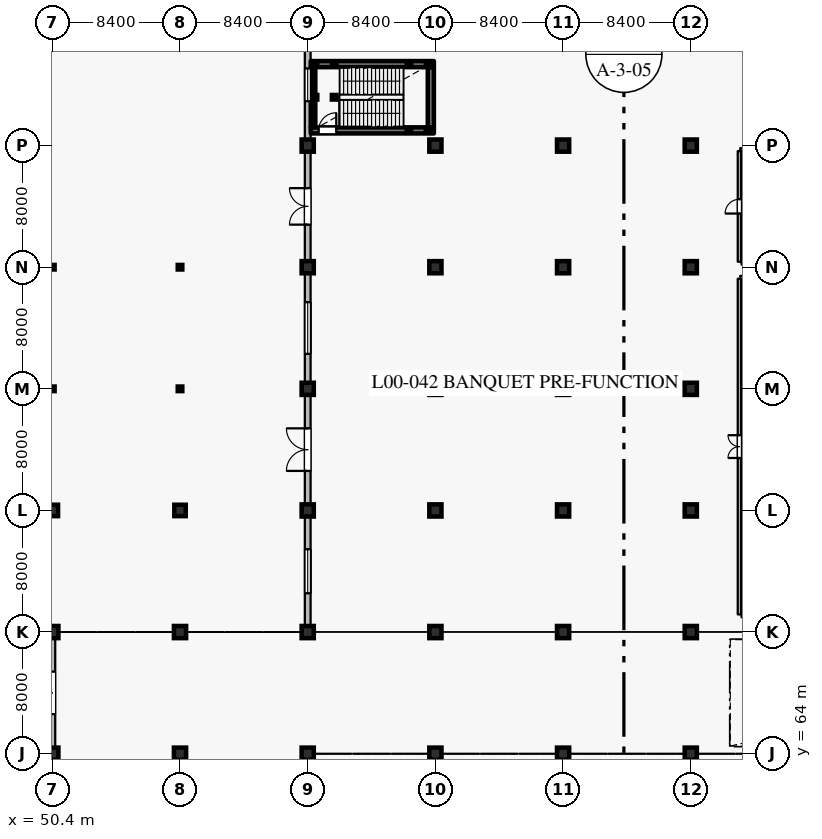
"""IFC4 building model, lengths in metres.
Left out: names, types, materials, properties, quantities, classifications, styles, units other than length and angle.
Written with IfcOpenShell. Run it as: python <this file> out.ifc"""

import sys

from ifc_helpers import new_model, si_unit, direction, frame, frame_2d, origin, origin_2d, place, context, subcontext, project, spatial, rectangle, hollow_rectangle, circle, extrude, element, fill, save


model = new_model("IFC4")
c1 = context("Model", 3, precision=1e-05, world=origin(), true_north=direction((0.0, 1.0)))
c2 = subcontext(c1, "Body", "Model", "MODEL_VIEW")
j1 = project(units=[si_unit("LENGTHUNIT", "METRE"), si_unit("PLANEANGLEUNIT", "RADIAN")], contexts=[c1])
p1 = place(None, origin())
s1 = spatial("IfcSite", under=j1, at=p1, CompositionType="ELEMENT")
p2 = place(p1, origin())
s2 = spatial("IfcBuilding", under=s1, at=p2, CompositionType="ELEMENT")
p3 = place(p2, origin())
s3 = spatial("IfcBuildingStorey", under=s2, at=p3, CompositionType="ELEMENT", Elevation=0.0)
for number, where, z_axis, x_axis in (
    (1, (50.4, 64.0, 0.0), (0.0, 0.0, 1.0), (1.0, 0.0, 0.0)),
    (2, (50.4, 72.0, 0.0), (0.0, 0.0, 1.0), (1.0, 0.0, 0.0)),
):
    element("IfcColumn", number, at=place(p3, frame(where, z_axis=z_axis, x_axis=x_axis)), inside=s3, PredefinedType="COLUMN", context=c2, shape_type="SweptSolid", body=[
        extrude(rectangle(XDim=0.8, YDim=0.8, at=origin_2d()), origin(), (0.0, 0.0, 1.0), 6.0),
    ])
p4 = place(p3, frame((50.4, 80.0, 0.0), z_axis=(0.0, 0.0, 1.0), x_axis=(1.0, 0.0, 0.0)))
e3 = element("IfcColumn", 3, at=p4, inside=s3, PredefinedType="COLUMN", context=c2, shape_type="SweptSolid", body=[
    extrude(circle(Radius=0.375, at=origin_2d()), origin(), (0.0, 0.0, 1.0), 6.0),
])
for number, where, z_axis, x_axis in (
    (4, (50.4, 88.0, 0.0), (0.0, 0.0, 1.0), (1.0, 0.0, 0.0)),
    (5, (50.4, 96.0, 0.0), (0.0, 0.0, 1.0), (1.0, 0.0, 0.0)),
):
    element("IfcColumn", number, at=place(p3, frame(where, z_axis=z_axis, x_axis=x_axis)), inside=s3, PredefinedType="COLUMN", context=c2, shape_type="SweptSolid", body=[
        extrude(hollow_rectangle(XDim=0.3, YDim=0.3, WallThickness=0.012, at=origin_2d()), origin(), (0.0, 0.0, 1.0), 6.0),
    ])
for number, where, z_axis, x_axis in (
    (6, (58.8, 64.0, 0.0), (0.0, 0.0, 1.0), (1.0, 0.0, 0.0)),
    (7, (58.8, 72.0, 0.0), (0.0, 0.0, 1.0), (1.0, 0.0, 0.0)),
):
    element("IfcColumn", number, at=place(p3, frame(where, z_axis=z_axis, x_axis=x_axis)), inside=s3, PredefinedType="COLUMN", context=c2, shape_type="SweptSolid", body=[
        extrude(rectangle(XDim=0.8, YDim=0.8, at=origin_2d()), origin(), (0.0, 0.0, 1.0), 6.0),
    ])
p5 = place(p3, frame((58.8, 80.0, 0.0), z_axis=(0.0, 0.0, 1.0), x_axis=(1.0, 0.0, 0.0)))
e8 = element("IfcColumn", 8, at=p5, inside=s3, PredefinedType="COLUMN", context=c2, shape_type="SweptSolid", body=[
    extrude(circle(Radius=0.375, at=origin_2d()), origin(), (0.0, 0.0, 1.0), 6.0),
])
for number, where, z_axis, x_axis in (
    (9, (58.8, 88.0, 0.0), (0.0, 0.0, 1.0), (1.0, 0.0, 0.0)),
    (10, (58.8, 96.0, 0.0), (0.0, 0.0, 1.0), (1.0, 0.0, 0.0)),
):
    element("IfcColumn", number, at=place(p3, frame(where, z_axis=z_axis, x_axis=x_axis)), inside=s3, PredefinedType="COLUMN", context=c2, shape_type="SweptSolid", body=[
        extrude(hollow_rectangle(XDim=0.3, YDim=0.3, WallThickness=0.012, at=origin_2d()), origin(), (0.0, 0.0, 1.0), 6.0),
    ])
for number, where, z_axis, x_axis in (
    (11, (67.2, 64.0, 0.0), (0.0, 0.0, 1.0), (1.0, 0.0, 0.0)),
    (12, (67.2, 72.0, 0.0), (0.0, 0.0, 1.0), (1.0, 0.0, 0.0)),
    (13, (67.2, 80.0, 0.0), (0.0, 0.0, 1.0), (1.0, 0.0, 0.0)),
    (14, (67.2, 88.0, 0.0), (0.0, 0.0, 1.0), (1.0, 0.0, 0.0)),
    (15, (67.2, 96.0, 0.0), (0.0, 0.0, 1.0), (1.0, 0.0, 0.0)),
    (16, (67.2, 104.0, 0.0), (0.0, 0.0, 1.0), (1.0, 0.0, 0.0)),
    (17, (75.6, 64.0, 0.0), (0.0, 0.0, 1.0), (1.0, 0.0, 0.0)),
    (18, (75.6, 72.0, 0.0), (0.0, 0.0, 1.0), (1.0, 0.0, 0.0)),
    (19, (75.6, 80.0, 0.0), (0.0, 0.0, 1.0), (1.0, 0.0, 0.0)),
    (20, (75.6, 88.0, 0.0), (0.0, 0.0, 1.0), (1.0, 0.0, 0.0)),
    (21, (75.6, 96.0, 0.0), (0.0, 0.0, 1.0), (1.0, 0.0, 0.0)),
    (22, (75.6, 104.0, 0.0), (0.0, 0.0, 1.0), (1.0, 0.0, 0.0)),
    (23, (84.0, 64.0, 0.0), (0.0, 0.0, 1.0), (1.0, 0.0, 0.0)),
    (24, (84.0, 72.0, 0.0), (0.0, 0.0, 1.0), (1.0, 0.0, 0.0)),
    (25, (84.0, 80.0, 0.0), (0.0, 0.0, 1.0), (1.0, 0.0, 0.0)),
    (26, (84.0, 88.0, 0.0), (0.0, 0.0, 1.0), (1.0, 0.0, 0.0)),
    (27, (84.0, 96.0, 0.0), (0.0, 0.0, 1.0), (1.0, 0.0, 0.0)),
    (28, (84.0, 104.0, 0.0), (0.0, 0.0, 1.0), (1.0, 0.0, 0.0)),
    (29, (92.4, 64.0, 0.0), (0.0, 0.0, 1.0), (1.0, 0.0, 0.0)),
    (30, (92.4, 72.0, 0.0), (0.0, 0.0, 1.0), (1.0, 0.0, 0.0)),
    (31, (92.4, 80.0, 0.0), (0.0, 0.0, 1.0), (1.0, 0.0, 0.0)),
    (32, (92.4, 88.0, 0.0), (0.0, 0.0, 1.0), (1.0, 0.0, 0.0)),
    (33, (92.4, 96.0, 0.0), (0.0, 0.0, 1.0), (1.0, 0.0, 0.0)),
    (34, (92.4, 104.0, 0.0), (0.0, 0.0, 1.0), (1.0, 0.0, 0.0)),
):
    element("IfcColumn", number, at=place(p3, frame(where, z_axis=z_axis, x_axis=x_axis)), inside=s3, PredefinedType="COLUMN", context=c2, shape_type="SweptSolid", body=[
        extrude(rectangle(XDim=0.8, YDim=0.8, at=origin_2d()), origin(), (0.0, 0.0, 1.0), 6.0),
    ])
p6 = place(p3, frame((67.2, 72.4, 0.0), z_axis=(0.0, 0.0, 1.0), x_axis=(0.0, 1.0, 0.0)))
e35 = element("IfcWall", 35, at=p6, inside=s3, PredefinedType="SOLIDWALL", context=c2, shape_type="SweptSolid", body=[
    extrude(rectangle(XDim=7.2, YDim=0.38, at=frame_2d((3.6, 0.0))), origin(), (0.0, 0.0, 1.0), 5.7),
])
p7 = place(p6, frame((2.15, 0.0, 1.05)))
e36 = element("IfcOpeningElement", 36, at=p7, cuts=e35, PredefinedType="OPENING", context=c2, shape_type="SweptSolid", body=[
    extrude(rectangle(XDim=2.9, YDim=1.75, at=frame_2d((1.45, 0.875))), frame((0.0, 0.2, 0.0), z_axis=(0.0, -1.0, 0.0), x_axis=(1.0, 0.0, 0.0)), (0.0, 0.0, 1.0), 0.4),
])
p8 = place(p3, frame((67.2, 80.4, 0.0), z_axis=(0.0, 0.0, 1.0), x_axis=(0.0, 1.0, 0.0)))
e37 = element("IfcWall", 37, at=p8, inside=s3, PredefinedType="SOLIDWALL", context=c2, shape_type="SweptSolid", body=[
    extrude(rectangle(XDim=7.2, YDim=0.38, at=frame_2d((3.6, 0.0))), origin(), (0.0, 0.0, 1.0), 5.7),
])
p9 = place(p8, frame((2.2, 0.0, 0.0)))
e38 = element("IfcOpeningElement", 38, at=p9, cuts=e37, PredefinedType="OPENING", context=c2, shape_type="SweptSolid", body=[
    extrude(rectangle(XDim=2.8, YDim=2.8, at=frame_2d((1.4, 1.4))), frame((0.0, 0.2, 0.0), z_axis=(0.0, -1.0, 0.0), x_axis=(1.0, 0.0, 0.0)), (0.0, 0.0, 1.0), 0.4),
])
p10 = place(p3, frame((67.2, 88.4, 0.0), z_axis=(0.0, 0.0, 1.0), x_axis=(0.0, 1.0, 0.0)))
e39 = element("IfcWall", 39, at=p10, inside=s3, PredefinedType="SOLIDWALL", context=c2, shape_type="SweptSolid", body=[
    extrude(rectangle(XDim=7.2, YDim=0.38, at=frame_2d((3.6, 0.0))), origin(), (0.0, 0.0, 1.0), 5.7),
])
p11 = place(p10, frame((1.9, 0.0, 1.05)))
e40 = element("IfcOpeningElement", 40, at=p11, cuts=e39, PredefinedType="OPENING", context=c2, shape_type="SweptSolid", body=[
    extrude(rectangle(XDim=3.4, YDim=1.85, at=frame_2d((1.7, 0.925))), frame((0.0, 0.2, 0.0), z_axis=(0.0, -1.0, 0.0), x_axis=(1.0, 0.0, 0.0)), (0.0, 0.0, 1.0), 0.4),
])
p12 = place(p3, frame((67.2, 96.4, 0.0), z_axis=(0.0, 0.0, 1.0), x_axis=(0.0, 1.0, 0.0)))
e41 = element("IfcWall", 41, at=p12, inside=s3, PredefinedType="SOLIDWALL", context=c2, shape_type="SweptSolid", body=[
    extrude(rectangle(XDim=7.2, YDim=0.38, at=frame_2d((3.6, 0.0))), origin(), (0.0, 0.0, 1.0), 5.7),
])
p13 = place(p12, frame((2.4, 0.0, 0.0)))
e42 = element("IfcOpeningElement", 42, at=p13, cuts=e41, PredefinedType="OPENING", context=c2, shape_type="SweptSolid", body=[
    extrude(rectangle(XDim=2.4, YDim=2.6, at=frame_2d((1.2, 1.3))), frame((0.0, 0.2, 0.0), z_axis=(0.0, -1.0, 0.0), x_axis=(1.0, 0.0, 0.0)), (0.0, 0.0, 1.0), 0.4),
])
p14 = place(p3, frame((67.2, 104.4, 0.0), z_axis=(0.0, 0.0, 1.0), x_axis=(0.0, 1.0, 0.0)))
e43 = element("IfcWall", 43, at=p14, inside=s3, PredefinedType="SOLIDWALL", context=c2, shape_type="SweptSolid", body=[
    extrude(rectangle(XDim=7.2, YDim=0.38, at=frame_2d((3.6, 0.0))), origin(), (0.0, 0.0, 1.0), 5.7),
])
p15 = place(p14, frame((2.525, 0.0, 1.05)))
e44 = element("IfcOpeningElement", 44, at=p15, cuts=e43, PredefinedType="OPENING", context=c2, shape_type="SweptSolid", body=[
    extrude(rectangle(XDim=2.15, YDim=2.1, at=frame_2d((1.075, 1.05))), frame((0.0, 0.2, 0.0), z_axis=(0.0, -1.0, 0.0), x_axis=(1.0, 0.0, 0.0)), (0.0, 0.0, 1.0), 0.4),
])
p16 = place(p3, frame((50.4, 63.6, 0.0), z_axis=(0.0, 0.0, 1.0), x_axis=(0.0, -1.0, 0.0)))
e45 = element("IfcWall", 45, at=p16, inside=s3, PredefinedType="SOLIDWALL", context=c2, shape_type="SweptSolid", body=[
    extrude(rectangle(XDim=7.15, YDim=0.38, at=frame_2d((3.575, 0.0))), origin(), (0.0, 0.0, 1.0), 5.0),
])
p17 = place(p16, frame((2.375, 0.0, 0.0)))
e46 = element("IfcOpeningElement", 46, at=p17, cuts=e45, PredefinedType="OPENING", context=c2, shape_type="SweptSolid", body=[
    extrude(rectangle(XDim=2.4, YDim=2.6, at=frame_2d((1.2, 1.3))), frame((0.0, 0.2, 0.0), z_axis=(0.0, -1.0, 0.0), x_axis=(1.0, 0.0, 0.0)), (0.0, 0.0, 1.0), 0.4),
])
p18 = place(p3, frame((50.4, 64.4, 0.0), z_axis=(0.0, 0.0, 1.0), x_axis=(0.0, 1.0, 0.0)))
e47 = element("IfcWall", 47, at=p18, inside=s3, PredefinedType="SOLIDWALL", context=c2, shape_type="SweptSolid", body=[
    extrude(rectangle(XDim=7.2, YDim=0.38, at=frame_2d((3.6, 0.0))), origin(), (0.0, 0.0, 1.0), 5.7),
])
p19 = place(p18, frame((2.2, 0.0, 0.0)))
e48 = element("IfcOpeningElement", 48, at=p19, cuts=e47, PredefinedType="OPENING", context=c2, shape_type="SweptSolid", body=[
    extrude(rectangle(XDim=2.8, YDim=2.8, at=frame_2d((1.4, 1.4))), frame((0.0, 0.2, 0.0), z_axis=(0.0, -1.0, 0.0), x_axis=(1.0, 0.0, 0.0)), (0.0, 0.0, 1.0), 0.4),
])
p20 = place(p3, frame((67.4, 105.0, 0.0), z_axis=(0.0, 0.0, 1.0), x_axis=(1.0, 0.0, 0.0)))
e49 = element("IfcWall", 49, at=p20, inside=s3, PredefinedType="SHEAR", context=c2, shape_type="SweptSolid", body=[
    extrude(rectangle(XDim=8.1, YDim=0.4, at=frame_2d((4.05, 0.0))), origin(), (0.0, 0.0, 1.0), 5.675),
])
p21 = place(p20, frame((0.52, 0.0, 0.0)))
e50 = element("IfcOpeningElement", 50, at=p21, cuts=e49, PredefinedType="OPENING", context=c2, shape_type="SweptSolid", body=[
    extrude(rectangle(XDim=1.16, YDim=2.2, at=frame_2d((0.58, 1.1))), frame((0.0, 0.21, 0.0), z_axis=(0.0, -1.0, 0.0), x_axis=(1.0, 0.0, 0.0)), (0.0, 0.0, 1.0), 0.42),
])
p22 = place(p3, frame((75.3, 105.205, 0.0), z_axis=(0.0, 0.0, 1.0), x_axis=(0.0, 1.0, 0.0)))
e51 = element("IfcWall", 51, at=p22, inside=s3, PredefinedType="SHEAR", context=c2, shape_type="SweptSolid", body=[
    extrude(rectangle(XDim=3.95, YDim=0.4, at=frame_2d((1.975, 0.0))), origin(), (0.0, 0.0, 1.0), 5.675),
])
p23 = place(p3, frame((67.4, 109.36, 0.0), z_axis=(0.0, 0.0, 1.0), x_axis=(1.0, 0.0, 0.0)))
e52 = element("IfcWall", 52, at=p23, inside=s3, PredefinedType="SHEAR", context=c2, shape_type="SweptSolid", body=[
    extrude(rectangle(XDim=8.1, YDim=0.4, at=frame_2d((4.05, 0.0))), origin(), (0.0, 0.0, 1.0), 5.675),
])
p24 = place(p3, frame((67.55, 105.205, 0.0), z_axis=(0.0, 0.0, 1.0), x_axis=(0.0, 1.0, 0.0)))
e53 = element("IfcWall", 53, at=p24, inside=s3, PredefinedType="SHEAR", context=c2, shape_type="SweptSolid", body=[
    extrude(rectangle(XDim=3.95, YDim=0.3, at=frame_2d((1.975, 0.0))), origin(), (0.0, 0.0, 1.0), 5.675),
])
for number, where, z_axis, x_axis in (
    (54, (67.68, 107.18, 0.0), (0.0, 0.0, 1.0), (1.0, 0.0, 0.0)),
    (55, (67.68, 109.36, 0.0), (0.0, 0.0, 1.0), (1.0, 0.0, 0.0)),
    (56, (68.94, 107.18, 0.0), (0.0, 0.0, 1.0), (1.0, 0.0, 0.0)),
    (57, (68.94, 109.36, 0.0), (0.0, 0.0, 1.0), (1.0, 0.0, 0.0)),
):
    element("IfcColumn", number, at=place(p3, frame(where, z_axis=z_axis, x_axis=x_axis)), inside=s3, PredefinedType="COLUMN", context=c2, shape_type="SweptSolid", body=[
        extrude(hollow_rectangle(XDim=0.3, YDim=0.3, WallThickness=0.012, at=origin_2d()), origin(), (0.0, 0.0, 1.0), 5.82),
    ])
for number, where, z_axis, x_axis in (
    (58, (73.86, 105.0, -2.7), (0.0, 0.0, 1.0), (1.0, 0.0, 0.0)),
    (59, (73.86, 109.36, -2.7), (0.0, 0.0, 1.0), (1.0, 0.0, 0.0)),
    (60, (75.12, 105.0, -2.7), (0.0, 0.0, 1.0), (1.0, 0.0, 0.0)),
    (61, (75.12, 109.36, -2.7), (0.0, 0.0, 1.0), (1.0, 0.0, 0.0)),
):
    element("IfcColumn", number, at=place(p3, frame(where, z_axis=z_axis, x_axis=x_axis)), inside=s3, PredefinedType="COLUMN", context=c2, shape_type="SweptSolid", body=[
        extrude(hollow_rectangle(XDim=0.3, YDim=0.3, WallThickness=0.012, at=origin_2d()), origin(), (0.0, 0.0, 1.0), 5.52),
    ])
p25 = place(p3, frame((95.6, 73.16, 0.0), z_axis=(0.0, 0.0, 1.0), x_axis=(0.0, 1.0, 0.0)))
e62 = element("IfcWall", 62, at=p25, inside=s3, PredefinedType="PARTITIONING", context=c2, shape_type="SweptSolid", body=[
    extrude(rectangle(XDim=22.08, YDim=0.22, at=frame_2d((11.04, 0.0))), origin(), (0.0, 0.0, 1.0), 5.675),
])
p26 = place(p25, frame((10.29, 0.0, 0.0)))
e63 = element("IfcOpeningElement", 63, at=p26, cuts=e62, PredefinedType="OPENING", context=c2, shape_type="SweptSolid", body=[
    extrude(rectangle(XDim=1.5, YDim=2.3, at=frame_2d((0.75, 1.15))), frame((0.0, 0.12, 0.0), z_axis=(0.0, -1.0, 0.0), x_axis=(1.0, 0.0, 0.0)), (0.0, 0.0, 1.0), 0.24),
])
p27 = place(p3, frame((95.74, 73.08, 0.0), z_axis=(0.0, 0.0, 1.0), x_axis=(1.0, 0.0, 0.0)))
e64 = element("IfcWall", 64, at=p27, inside=s3, PredefinedType="PARTITIONING", context=c2, shape_type="SweptSolid", body=[
    extrude(rectangle(XDim=28.81, YDim=0.22, at=frame_2d((14.405, 0.0))), origin(), (0.0, 0.0, 1.0), 5.675),
])
p28 = place(p3, frame((95.6, 96.36, 0.0), z_axis=(0.0, 0.0, 1.0), x_axis=(0.0, 1.0, 0.0)))
e65 = element("IfcWall", 65, at=p28, inside=s3, PredefinedType="PARTITIONING", context=c2, shape_type="SweptSolid", body=[
    extrude(rectangle(XDim=7.28, YDim=0.22, at=frame_2d((3.64, 0.0))), origin(), (0.0, 0.0, 1.0), 5.675),
])
p29 = place(p28, frame((3.17, 0.0, 0.0)))
e66 = element("IfcOpeningElement", 66, at=p29, cuts=e65, PredefinedType="OPENING", context=c2, shape_type="SweptSolid", body=[
    extrude(rectangle(XDim=0.94, YDim=2.15, at=frame_2d((0.47, 1.075))), frame((0.0, 0.12, 0.0), z_axis=(0.0, -1.0, 0.0), x_axis=(1.0, 0.0, 0.0)), (0.0, 0.0, 1.0), 0.24),
])
p30 = place(p3, frame((95.74, 96.28, 0.0), z_axis=(0.0, 0.0, 1.0), x_axis=(1.0, 0.0, 0.0)))
e67 = element("IfcWall", 67, at=p30, inside=s3, PredefinedType="PARTITIONING", context=c2, shape_type="SweptSolid", body=[
    extrude(rectangle(XDim=12.41, YDim=0.22, at=frame_2d((6.205, 0.0))), origin(), (0.0, 0.0, 1.0), 4.85),
])
p31 = place(p3, frame((95.652, 95.32, 0.0), z_axis=(0.0, 0.0, 1.0), x_axis=(1.0, 0.0, 0.0)))
e68 = element("IfcWall", 68, at=p31, inside=s3, PredefinedType="PARTITIONING", context=c2, shape_type="SweptSolid", body=[
    extrude(rectangle(XDim=4.848, YDim=0.22, at=frame_2d((2.424, 0.0))), origin(), (0.0, 0.0, 1.0), 5.675),
])
p32 = place(p3, frame((95.652, 103.72, 0.0), z_axis=(0.0, 0.0, 1.0), x_axis=(1.0, 0.0, 0.0)))
e69 = element("IfcWall", 69, at=p32, inside=s3, PredefinedType="PARTITIONING", context=c2, shape_type="SweptSolid", body=[
    extrude(rectangle(XDim=4.748, YDim=0.22, at=frame_2d((2.374, 0.0))), origin(), (0.0, 0.0, 1.0), 4.85),
])
p33 = place(p7, origin())
e70 = element("IfcWindow", 70, at=p33, inside=s3, PartitioningType="DOUBLE_PANEL_VERTICAL", PredefinedType="WINDOW", context=c2, shape_type="SweptSolid", body=[
    extrude(rectangle(XDim=2.9, YDim=1.75, at=frame_2d((1.45, 0.875))), frame((0.0, 0.03, 0.0), z_axis=(0.0, -1.0, 0.0), x_axis=(1.0, 0.0, 0.0)), (0.0, 0.0, 1.0), 0.06),
])
fill(e36, e70)
p34 = place(p9, origin())
e71 = element("IfcDoor", 71, at=p34, inside=s3, OperationType="DOUBLE_DOOR_SINGLE_SWING", PredefinedType="DOOR", context=c2, shape_type="SweptSolid", body=[
    extrude(rectangle(XDim=2.8, YDim=2.8, at=frame_2d((1.4, 1.4))), frame((0.0, 0.025, 0.0), z_axis=(0.0, -1.0, 0.0), x_axis=(1.0, 0.0, 0.0)), (0.0, 0.0, 1.0), 0.05),
])
fill(e38, e71)
p35 = place(p11, origin())
e72 = element("IfcWindow", 72, at=p35, inside=s3, PartitioningType="DOUBLE_PANEL_VERTICAL", PredefinedType="WINDOW", context=c2, shape_type="SweptSolid", body=[
    extrude(rectangle(XDim=3.4, YDim=1.85, at=frame_2d((1.7, 0.925))), frame((0.0, 0.03, 0.0), z_axis=(0.0, -1.0, 0.0), x_axis=(1.0, 0.0, 0.0)), (0.0, 0.0, 1.0), 0.06),
])
fill(e40, e72)
p36 = place(p13, origin())
e73 = element("IfcDoor", 73, at=p36, inside=s3, OperationType="DOUBLE_DOOR_SINGLE_SWING", PredefinedType="DOOR", context=c2, shape_type="SweptSolid", body=[
    extrude(rectangle(XDim=2.4, YDim=2.6, at=frame_2d((1.2, 1.3))), frame((0.0, 0.025, 0.0), z_axis=(0.0, -1.0, 0.0), x_axis=(1.0, 0.0, 0.0)), (0.0, 0.0, 1.0), 0.05),
])
fill(e42, e73)
p37 = place(p15, origin())
e74 = element("IfcWindow", 74, at=p37, inside=s3, PartitioningType="DOUBLE_PANEL_VERTICAL", PredefinedType="WINDOW", context=c2, shape_type="SweptSolid", body=[
    extrude(rectangle(XDim=2.15, YDim=2.1, at=frame_2d((1.075, 1.05))), frame((0.0, 0.03, 0.0), z_axis=(0.0, -1.0, 0.0), x_axis=(1.0, 0.0, 0.0)), (0.0, 0.0, 1.0), 0.06),
])
fill(e44, e74)
p38 = place(p19, origin())
e75 = element("IfcDoor", 75, at=p38, inside=s3, OperationType="DOUBLE_DOOR_SINGLE_SWING", PredefinedType="DOOR", context=c2, shape_type="SweptSolid", body=[
    extrude(rectangle(XDim=2.8, YDim=2.8, at=frame_2d((1.4, 1.4))), frame((0.0, 0.025, 0.0), z_axis=(0.0, -1.0, 0.0), x_axis=(1.0, 0.0, 0.0)), (0.0, 0.0, 1.0), 0.05),
])
fill(e48, e75)
p39 = place(p21, origin())
e76 = element("IfcDoor", 76, at=p39, inside=s3, OperationType="SINGLE_SWING_RIGHT", PredefinedType="DOOR", context=c2, shape_type="SweptSolid", body=[
    extrude(rectangle(XDim=1.16, YDim=2.2, at=frame_2d((0.58, 1.1))), frame((0.0, 0.025, 0.0), z_axis=(0.0, -1.0, 0.0), x_axis=(1.0, 0.0, 0.0)), (0.0, 0.0, 1.0), 0.05),
])
fill(e50, e76)
p40 = place(p26, origin())
e77 = element("IfcDoor", 77, at=p40, inside=s3, OperationType="DOUBLE_DOOR_SINGLE_SWING", PredefinedType="DOOR", context=c2, shape_type="SweptSolid", body=[
    extrude(rectangle(XDim=1.5, YDim=2.3, at=frame_2d((0.75, 1.15))), frame((0.0, 0.025, 0.0), z_axis=(0.0, -1.0, 0.0), x_axis=(1.0, 0.0, 0.0)), (0.0, 0.0, 1.0), 0.05),
])
fill(e63, e77)
p41 = place(p29, origin())
e78 = element("IfcDoor", 78, at=p41, inside=s3, OperationType="SINGLE_SWING_LEFT", PredefinedType="DOOR", context=c2, shape_type="SweptSolid", body=[
    extrude(rectangle(XDim=0.94, YDim=2.15, at=frame_2d((0.47, 1.075))), frame((0.0, 0.025, 0.0), z_axis=(0.0, -1.0, 0.0), x_axis=(1.0, 0.0, 0.0)), (0.0, 0.0, 1.0), 0.05),
])
fill(e66, e78)
save(model, sys.argv[1])
